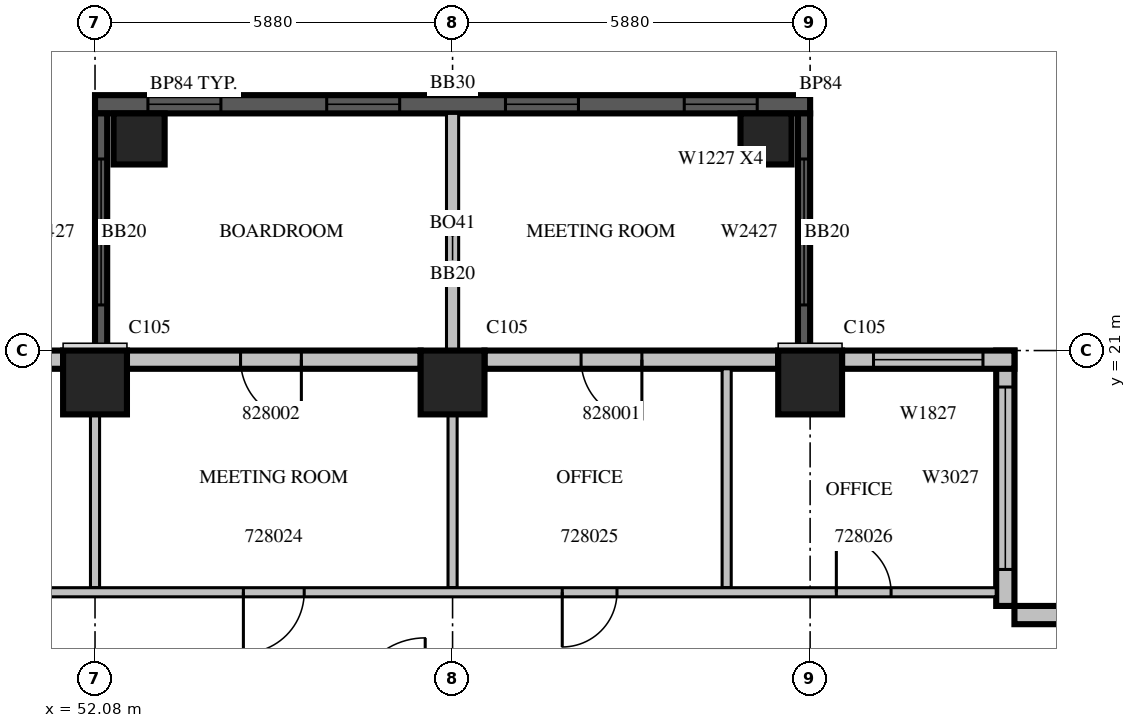
"""IFC4 building model, lengths in metres.
Left out: names, types, materials, properties, quantities, classifications, styles, units other than length and angle.
Written with IfcOpenShell. Run it as: python <this file> out.ifc"""

import sys

from ifc_helpers import new_model, si_unit, direction, frame, frame_2d, origin, origin_2d, place, context, subcontext, project, spatial, rectangle, extrude, source, transform, mapped, element, fill, save


model = new_model("IFC4")
c1 = context("Model", 3, precision=1e-05, world=origin(), true_north=direction((0.0, 1.0)))
c2 = subcontext(c1, "Body", "Model", "MODEL_VIEW")
j1 = project(units=[si_unit("LENGTHUNIT", "METRE"), si_unit("PLANEANGLEUNIT", "RADIAN")], contexts=[c1])
p1 = place(None, origin())
s1 = spatial("IfcSite", under=j1, at=p1, CompositionType="ELEMENT")
p2 = place(p1, origin())
s2 = spatial("IfcBuilding", under=s1, at=p2, CompositionType="ELEMENT")
p3 = place(p2, frame((0.0, 0.0, 128.7)))
s3 = spatial("IfcBuildingStorey", under=s2, at=p3, CompositionType="ELEMENT", Elevation=128.7)
m1 = source(origin(), c2, "Body", "SweptSolid", [
    extrude(rectangle(XDim=1.05, YDim=1.05, at=origin_2d()), origin(), (0.0, 0.0, 1.0), 4.2),
])
for number, where, z_axis, x_axis in (
    (1, (52.08, 20.475, 0.0), (0.0, 0.0, 1.0), (1.0, 0.0, 0.0)),
    (2, (57.96, 20.475, 0.0), (0.0, 0.0, 1.0), (1.0, 0.0, 0.0)),
    (3, (63.84, 20.475, 0.0), (0.0, 0.0, 1.0), (1.0, 0.0, 0.0)),
):
    element("IfcColumn", number, at=place(p3, frame(where, z_axis=z_axis, x_axis=x_axis)), inside=s3, PredefinedType="COLUMN", context=c2, shape_type="MappedRepresentation", body=[
        mapped(m1, transform((0.0, 0.0, 0.0), scale=1.0)),
    ])
m2 = source(origin(), c2, "Body", "SweptSolid", [
    extrude(rectangle(XDim=0.84, YDim=0.84, at=origin_2d()), origin(), (0.0, 0.0, 1.0), 4.2),
])
for number, where, z_axis, x_axis in (
    (4, (52.805, 24.48, 0.0), (0.0, 0.0, 1.0), (1.0, 0.0, 0.0)),
    (5, (63.115, 24.48, 0.0), (0.0, 0.0, 1.0), (1.0, 0.0, 0.0)),
):
    element("IfcColumn", number, at=place(p3, frame(where, z_axis=z_axis, x_axis=x_axis)), inside=s3, PredefinedType="COLUMN", context=c2, shape_type="MappedRepresentation", body=[
        mapped(m2, transform((0.0, 0.0, 0.0), scale=1.0)),
    ])
m3 = source(origin(), c2, "Body", "SweptSolid", [
    extrude(rectangle(XDim=11.76, YDim=0.3, at=frame_2d((5.88, 0.0))), origin(), (0.0, 0.0, 1.0), 3.79),
])
p4 = place(p3, frame((63.84, 25.05, 0.0), z_axis=(0.0, 0.0, 1.0), x_axis=(-1.0, 0.0, 0.0)))
e6 = element("IfcWall", 6, at=p4, inside=s3, PredefinedType="SOLIDWALL", context=c2, shape_type="MappedRepresentation", body=[
    mapped(m3, transform((0.0, 0.0, 0.0), scale=1.0)),
])
m4 = source(origin(), c2, "Body", "SweptSolid", [
    extrude(rectangle(XDim=1.2, YDim=2.7, at=frame_2d((0.6, 1.35))), frame((0.0, 0.16, 0.0), z_axis=(0.0, -1.0, 0.0), x_axis=(1.0, 0.0, 0.0)), (0.0, 0.0, 1.0), 0.32),
])
p5 = place(p4, frame((0.87, 0.0, 0.6)))
e7 = element("IfcOpeningElement", 7, at=p5, cuts=e6, PredefinedType="OPENING", context=c2, shape_type="MappedRepresentation", body=[
    mapped(m4, transform((0.0, 0.0, 0.0), scale=1.0)),
])
p6 = place(p4, frame((3.81, 0.0, 0.6)))
e8 = element("IfcOpeningElement", 8, at=p6, cuts=e6, PredefinedType="OPENING", context=c2, shape_type="MappedRepresentation", body=[
    mapped(m4, transform((0.0, 0.0, 0.0), scale=1.0)),
])
p7 = place(p4, frame((6.75, 0.0, 0.6)))
e9 = element("IfcOpeningElement", 9, at=p7, cuts=e6, PredefinedType="OPENING", context=c2, shape_type="MappedRepresentation", body=[
    mapped(m4, transform((0.0, 0.0, 0.0), scale=1.0)),
])
p8 = place(p4, frame((9.69, 0.0, 0.6)))
e10 = element("IfcOpeningElement", 10, at=p8, cuts=e6, PredefinedType="OPENING", context=c2, shape_type="MappedRepresentation", body=[
    mapped(m4, transform((0.0, 0.0, 0.0), scale=1.0)),
])
m5 = source(origin(), c2, "Body", "SweptSolid", [
    extrude(rectangle(XDim=3.9, YDim=0.2, at=frame_2d((1.95, 0.0))), origin(), (0.0, 0.0, 1.0), 3.79),
])
p9 = place(p3, frame((57.96, 21.0, 0.0), z_axis=(0.0, 0.0, 1.0), x_axis=(0.0, 1.0, 0.0)))
e11 = element("IfcWall", 11, at=p9, inside=s3, PredefinedType="SOLIDWALL", context=c2, shape_type="MappedRepresentation", body=[
    mapped(m5, transform((0.0, 0.0, 0.0), scale=1.0)),
])
m6 = source(origin(), c2, "Body", "SweptSolid", [
    extrude(rectangle(XDim=3.9, YDim=0.2, at=frame_2d((1.95, 0.0))), origin(), (0.0, 0.0, 1.0), 3.79),
])
p10 = place(p3, frame((63.74, 21.0, 0.0), z_axis=(0.0, 0.0, 1.0), x_axis=(0.0, 1.0, 0.0)))
e12 = element("IfcWall", 12, at=p10, inside=s3, PredefinedType="SOLIDWALL", context=c2, shape_type="MappedRepresentation", body=[
    mapped(m6, transform((0.0, 0.0, 0.0), scale=1.0)),
])
m7 = source(origin(), c2, "Body", "SweptSolid", [
    extrude(rectangle(XDim=2.4, YDim=2.7, at=frame_2d((1.2, 1.35))), frame((0.0, 0.11, 0.0), z_axis=(0.0, -1.0, 0.0), x_axis=(1.0, 0.0, 0.0)), (0.0, 0.0, 1.0), 0.22),
])
p11 = place(p10, frame((0.75, 0.0, 0.6)))
e13 = element("IfcOpeningElement", 13, at=p11, cuts=e12, PredefinedType="OPENING", context=c2, shape_type="MappedRepresentation", body=[
    mapped(m7, transform((0.0, 0.0, 0.0), scale=1.0)),
])
p12 = place(p3, frame((52.18, 21.0, 0.0), z_axis=(0.0, 0.0, 1.0), x_axis=(0.0, 1.0, 0.0)))
e14 = element("IfcWall", 14, at=p12, inside=s3, PredefinedType="SOLIDWALL", context=c2, shape_type="MappedRepresentation", body=[
    mapped(m6, transform((0.0, 0.0, 0.0), scale=1.0)),
])
p13 = place(p12, frame((0.75, 0.0, 0.6)))
e15 = element("IfcOpeningElement", 15, at=p13, cuts=e14, PredefinedType="OPENING", context=c2, shape_type="MappedRepresentation", body=[
    mapped(m7, transform((0.0, 0.0, 0.0), scale=1.0)),
])
m8 = source(origin(), c2, "Body", "SweptSolid", [
    extrude(rectangle(XDim=4.2, YDim=0.3, at=frame_2d((2.1, 0.0))), origin(), (0.0, 0.0, 1.0), 3.8),
])
p14 = place(p3, frame((71.4, 16.65, 0.0), z_axis=(0.0, 0.0, 1.0), x_axis=(-1.0, 0.0, 0.0)))
e16 = element("IfcWall", 16, at=p14, inside=s3, PredefinedType="STANDARD", context=c2, shape_type="MappedRepresentation", body=[
    mapped(m8, transform((0.0, 0.0, 0.0), scale=1.0)),
])
p15 = place(p14, frame((0.66, 0.0, 0.6)))
e17 = element("IfcOpeningElement", 17, at=p15, cuts=e16, PredefinedType="OPENING", context=c2, shape_type="MappedRepresentation", body=[
    mapped(m4, transform((0.0, 0.0, 0.0), scale=1.0)),
])
p16 = place(p3, frame((67.05, 16.8, 0.0), z_axis=(0.0, 0.0, 1.0), x_axis=(0.0, 1.0, 0.0)))
e18 = element("IfcWall", 18, at=p16, inside=s3, PredefinedType="STANDARD", context=c2, shape_type="MappedRepresentation", body=[
    mapped(m8, transform((0.0, 0.0, 0.0), scale=1.0)),
])
m9 = source(origin(), c2, "Body", "SweptSolid", [
    extrude(rectangle(XDim=3.0, YDim=2.7, at=frame_2d((1.5, 1.35))), frame((0.0, 0.16, 0.0), z_axis=(0.0, -1.0, 0.0), x_axis=(1.0, 0.0, 0.0)), (0.0, 0.0, 1.0), 0.32),
])
p17 = place(p16, frame((0.6, 0.0, 0.6)))
e19 = element("IfcOpeningElement", 19, at=p17, cuts=e18, PredefinedType="OPENING", context=c2, shape_type="MappedRepresentation", body=[
    mapped(m9, transform((0.0, 0.0, 0.0), scale=1.0)),
])
m10 = source(origin(), c2, "Body", "SweptSolid", [
    extrude(rectangle(XDim=2.835, YDim=0.3, at=frame_2d((1.417, 0.0))), origin(), (0.0, 0.0, 1.0), 3.8),
])
p18 = place(p3, frame((67.2, 20.85, 0.0), z_axis=(0.0, 0.0, 1.0), x_axis=(-1.0, 0.0, 0.0)))
e20 = element("IfcWall", 20, at=p18, inside=s3, PredefinedType="STANDARD", context=c2, shape_type="MappedRepresentation", body=[
    mapped(m10, transform((0.0, 0.0, 0.0), scale=1.0)),
])
m11 = source(origin(), c2, "Body", "SweptSolid", [
    extrude(rectangle(XDim=1.8, YDim=2.7, at=frame_2d((0.9, 1.35))), frame((0.0, 0.16, 0.0), z_axis=(0.0, -1.0, 0.0), x_axis=(1.0, 0.0, 0.0)), (0.0, 0.0, 1.0), 0.32),
])
p19 = place(p18, frame((0.517, 0.0, 0.6)))
e21 = element("IfcOpeningElement", 21, at=p19, cuts=e20, PredefinedType="OPENING", context=c2, shape_type="MappedRepresentation", body=[
    mapped(m11, transform((0.0, 0.0, 0.0), scale=1.0)),
])
m12 = source(origin(), c2, "Body", "SweptSolid", [
    extrude(rectangle(XDim=4.83, YDim=0.3, at=frame_2d((2.415, 0.0))), origin(), (0.0, 0.0, 1.0), 3.8),
])
p20 = place(p3, frame((63.315, 20.85, 0.0), z_axis=(0.0, 0.0, 1.0), x_axis=(-1.0, 0.0, 0.0)))
e22 = element("IfcWall", 22, at=p20, inside=s3, PredefinedType="STANDARD", context=c2, shape_type="MappedRepresentation", body=[
    mapped(m12, transform((0.0, 0.0, 0.0), scale=1.0)),
])
m13 = source(origin(), c2, "Body", "SweptSolid", [
    extrude(rectangle(XDim=1.0, YDim=2.1, at=frame_2d((0.5, 1.05))), frame((0.0, 0.16, 0.0), z_axis=(0.0, -1.0, 0.0), x_axis=(1.0, 0.0, 0.0)), (0.0, 0.0, 1.0), 0.32),
])
p21 = place(p20, frame((2.242, 0.0, 0.0)))
e23 = element("IfcOpeningElement", 23, at=p21, cuts=e22, PredefinedType="OPENING", context=c2, shape_type="MappedRepresentation", body=[
    mapped(m13, transform((0.0, 0.0, 0.0), scale=1.0)),
])
p22 = place(p3, frame((57.435, 20.85, 0.0), z_axis=(0.0, 0.0, 1.0), x_axis=(-1.0, 0.0, 0.0)))
e24 = element("IfcWall", 24, at=p22, inside=s3, PredefinedType="STANDARD", context=c2, shape_type="MappedRepresentation", body=[
    mapped(m12, transform((0.0, 0.0, 0.0), scale=1.0)),
])
p23 = place(p22, frame((1.962, 0.0, 0.0)))
e25 = element("IfcOpeningElement", 25, at=p23, cuts=e24, PredefinedType="OPENING", context=c2, shape_type="MappedRepresentation", body=[
    mapped(m13, transform((0.0, 0.0, 0.0), scale=1.0)),
])
m14 = source(origin(), c2, "Body", "SweptSolid", [
    extrude(rectangle(XDim=1.155, YDim=0.3, at=frame_2d((0.578, 0.0))), origin(), (0.0, 0.0, 1.0), 3.8),
])
p24 = place(p3, frame((51.555, 20.85, 0.0), z_axis=(0.0, 0.0, 1.0), x_axis=(-1.0, 0.0, 0.0)))
e26 = element("IfcWall", 26, at=p24, inside=s3, PredefinedType="STANDARD", context=c2, shape_type="MappedRepresentation", body=[
    mapped(m14, transform((0.0, 0.0, 0.0), scale=1.0)),
])
m15 = source(origin(), c2, "Body", "SweptSolid", [
    extrude(rectangle(XDim=3.6, YDim=0.15, at=frame_2d((1.8, 0.0))), origin(), (0.0, 0.0, 1.0), 3.8),
])
p25 = place(p3, frame((62.468, 20.7, 0.0), z_axis=(0.0, 0.0, 1.0), x_axis=(0.0, -1.0, 0.0)))
e27 = element("IfcWall", 27, at=p25, inside=s3, PredefinedType="PARTITIONING", context=c2, shape_type="MappedRepresentation", body=[
    mapped(m15, transform((0.0, 0.0, 0.0), scale=1.0)),
])
m16 = source(origin(), c2, "Body", "SweptSolid", [
    extrude(rectangle(XDim=2.851, YDim=0.15, at=frame_2d((1.425, 0.0))), origin(), (0.0, 0.0, 1.0), 3.8),
])
for number, where, z_axis, x_axis in (
    (28, (52.08, 17.1, 0.0), (0.0, 0.0, 1.0), (0.0, 1.0, 0.0)),
    (29, (57.96, 17.1, 0.0), (0.0, 0.0, 1.0), (0.0, 1.0, 0.0)),
):
    element("IfcWall", number, at=place(p3, frame(where, z_axis=z_axis, x_axis=x_axis)), inside=s3, PredefinedType="PARTITIONING", context=c2, shape_type="MappedRepresentation", body=[
        mapped(m16, transform((0.0, 0.0, 0.0), scale=1.0)),
    ])
m17 = source(origin(), c2, "Body", "SweptSolid", [
    extrude(rectangle(XDim=37.5, YDim=0.15, at=frame_2d((18.75, 0.0))), origin(), (0.0, 0.0, 1.0), 3.8),
])
p26 = place(p3, frame((29.4, 17.025, 0.0), z_axis=(0.0, 0.0, 1.0), x_axis=(1.0, 0.0, 0.0)))
e30 = element("IfcWall", 30, at=p26, inside=s3, PredefinedType="PARTITIONING", context=c2, shape_type="MappedRepresentation", body=[
    mapped(m17, transform((0.0, 0.0, 0.0), scale=1.0)),
])
m18 = source(origin(), c2, "Body", "SweptSolid", [
    extrude(rectangle(XDim=1.0, YDim=2.1, at=frame_2d((0.5, 1.05))), frame((0.0, 0.085, 0.0), z_axis=(0.0, -1.0, 0.0), x_axis=(1.0, 0.0, 0.0)), (0.0, 0.0, 1.0), 0.17),
])
p27 = place(p26, frame((1.357, 0.0, 0.0)))
e31 = element("IfcOpeningElement", 31, at=p27, cuts=e30, PredefinedType="OPENING", context=c2, shape_type="MappedRepresentation", body=[
    mapped(m18, transform((0.0, 0.0, 0.0), scale=1.0)),
])
p28 = place(p26, frame((4.669, 0.0, 0.0)))
e32 = element("IfcOpeningElement", 32, at=p28, cuts=e30, PredefinedType="OPENING", context=c2, shape_type="MappedRepresentation", body=[
    mapped(m18, transform((0.0, 0.0, 0.0), scale=1.0)),
])
p29 = place(p26, frame((7.012, 0.0, 0.0)))
e33 = element("IfcOpeningElement", 33, at=p29, cuts=e30, PredefinedType="OPENING", context=c2, shape_type="MappedRepresentation", body=[
    mapped(m18, transform((0.0, 0.0, 0.0), scale=1.0)),
])
m19 = source(origin(), c2, "Body", "SweptSolid", [
    extrude(rectangle(XDim=0.9, YDim=2.1, at=frame_2d((0.45, 1.05))), frame((0.0, 0.085, 0.0), z_axis=(0.0, -1.0, 0.0), x_axis=(1.0, 0.0, 0.0)), (0.0, 0.0, 1.0), 0.17),
])
p30 = place(p26, frame((10.342, 0.0, 0.0)))
e34 = element("IfcOpeningElement", 34, at=p30, cuts=e30, PredefinedType="OPENING", context=c2, shape_type="MappedRepresentation", body=[
    mapped(m19, transform((0.0, 0.0, 0.0), scale=1.0)),
])
p31 = place(p26, frame((15.09, 0.0, 0.0)))
e35 = element("IfcOpeningElement", 35, at=p31, cuts=e30, PredefinedType="OPENING", context=c2, shape_type="MappedRepresentation", body=[
    mapped(m19, transform((0.0, 0.0, 0.0), scale=1.0)),
])
p32 = place(p26, frame((19.837, 0.0, 0.0)))
e36 = element("IfcOpeningElement", 36, at=p32, cuts=e30, PredefinedType="OPENING", context=c2, shape_type="MappedRepresentation", body=[
    mapped(m19, transform((0.0, 0.0, 0.0), scale=1.0)),
])
p33 = place(p26, frame((25.12, 0.0, 0.0)))
e37 = element("IfcOpeningElement", 37, at=p33, cuts=e30, PredefinedType="OPENING", context=c2, shape_type="MappedRepresentation", body=[
    mapped(m18, transform((0.0, 0.0, 0.0), scale=1.0)),
])
p34 = place(p26, frame((30.364, 0.0, 0.0)))
e38 = element("IfcOpeningElement", 38, at=p34, cuts=e30, PredefinedType="OPENING", context=c2, shape_type="MappedRepresentation", body=[
    mapped(m19, transform((0.0, 0.0, 0.0), scale=1.0)),
])
p35 = place(p26, frame((34.871, 0.0, 0.0)))
e39 = element("IfcOpeningElement", 39, at=p35, cuts=e30, PredefinedType="OPENING", context=c2, shape_type="MappedRepresentation", body=[
    mapped(m19, transform((0.0, 0.0, 0.0), scale=1.0)),
])
m20 = source(origin(), c2, "Body", "SweptSolid", [
    extrude(rectangle(XDim=1.2, YDim=2.7, at=frame_2d((0.6, 1.35))), frame((0.0, 0.03, 0.0), z_axis=(0.0, -1.0, 0.0), x_axis=(1.0, 0.0, 0.0)), (0.0, 0.0, 1.0), 0.06),
])
p36 = place(p5, origin())
e40 = element("IfcWindow", 40, at=p36, inside=s3, PartitioningType="SINGLE_PANEL", PredefinedType="WINDOW", context=c2, shape_type="MappedRepresentation", body=[
    mapped(m20, transform((0.0, 0.0, 0.0), scale=1.0)),
])
fill(e7, e40)
p37 = place(p6, origin())
e41 = element("IfcWindow", 41, at=p37, inside=s3, PartitioningType="SINGLE_PANEL", PredefinedType="WINDOW", context=c2, shape_type="MappedRepresentation", body=[
    mapped(m20, transform((0.0, 0.0, 0.0), scale=1.0)),
])
fill(e8, e41)
p38 = place(p7, origin())
e42 = element("IfcWindow", 42, at=p38, inside=s3, PartitioningType="SINGLE_PANEL", PredefinedType="WINDOW", context=c2, shape_type="MappedRepresentation", body=[
    mapped(m20, transform((0.0, 0.0, 0.0), scale=1.0)),
])
fill(e9, e42)
p39 = place(p8, origin())
e43 = element("IfcWindow", 43, at=p39, inside=s3, PartitioningType="SINGLE_PANEL", PredefinedType="WINDOW", context=c2, shape_type="MappedRepresentation", body=[
    mapped(m20, transform((0.0, 0.0, 0.0), scale=1.0)),
])
fill(e10, e43)
m21 = source(origin(), c2, "Body", "SweptSolid", [
    extrude(rectangle(XDim=2.4, YDim=2.7, at=frame_2d((1.2, 1.35))), frame((0.0, 0.03, 0.0), z_axis=(0.0, -1.0, 0.0), x_axis=(1.0, 0.0, 0.0)), (0.0, 0.0, 1.0), 0.06),
])
p40 = place(p11, origin())
e44 = element("IfcWindow", 44, at=p40, inside=s3, PartitioningType="SINGLE_PANEL", PredefinedType="WINDOW", context=c2, shape_type="MappedRepresentation", body=[
    mapped(m21, transform((0.0, 0.0, 0.0), scale=1.0)),
])
fill(e13, e44)
p41 = place(p13, origin())
e45 = element("IfcWindow", 45, at=p41, inside=s3, PartitioningType="SINGLE_PANEL", PredefinedType="WINDOW", context=c2, shape_type="MappedRepresentation", body=[
    mapped(m21, transform((0.0, 0.0, 0.0), scale=1.0)),
])
fill(e15, e45)
m22 = source(origin(), c2, "Body", "SweptSolid", [
    extrude(rectangle(XDim=3.0, YDim=2.7, at=frame_2d((1.5, 1.35))), frame((0.0, 0.03, 0.0), z_axis=(0.0, -1.0, 0.0), x_axis=(1.0, 0.0, 0.0)), (0.0, 0.0, 1.0), 0.06),
])
p42 = place(p17, origin())
e46 = element("IfcWindow", 46, at=p42, inside=s3, PartitioningType="SINGLE_PANEL", PredefinedType="WINDOW", context=c2, shape_type="MappedRepresentation", body=[
    mapped(m22, transform((0.0, 0.0, 0.0), scale=1.0)),
])
fill(e19, e46)
m23 = source(origin(), c2, "Body", "SweptSolid", [
    extrude(rectangle(XDim=1.8, YDim=2.7, at=frame_2d((0.9, 1.35))), frame((0.0, 0.03, 0.0), z_axis=(0.0, -1.0, 0.0), x_axis=(1.0, 0.0, 0.0)), (0.0, 0.0, 1.0), 0.06),
])
p43 = place(p19, origin())
e47 = element("IfcWindow", 47, at=p43, inside=s3, PartitioningType="SINGLE_PANEL", PredefinedType="WINDOW", context=c2, shape_type="MappedRepresentation", body=[
    mapped(m23, transform((0.0, 0.0, 0.0), scale=1.0)),
])
fill(e21, e47)
m24 = source(origin(), c2, "Body", "SweptSolid", [
    extrude(rectangle(XDim=1.0, YDim=2.1, at=frame_2d((0.5, 1.05))), frame((0.0, 0.025, 0.0), z_axis=(0.0, -1.0, 0.0), x_axis=(1.0, 0.0, 0.0)), (0.0, 0.0, 1.0), 0.05),
])
p44 = place(p33, origin())
e48 = element("IfcDoor", 48, at=p44, inside=s3, OperationType="SINGLE_SWING_RIGHT", PredefinedType="DOOR", context=c2, shape_type="MappedRepresentation", body=[
    mapped(m24, transform((0.0, 0.0, 0.0), scale=1.0)),
])
fill(e37, e48)
m25 = source(origin(), c2, "Body", "SweptSolid", [
    extrude(rectangle(XDim=0.9, YDim=2.1, at=frame_2d((0.45, 1.05))), frame((0.0, 0.025, 0.0), z_axis=(0.0, -1.0, 0.0), x_axis=(1.0, 0.0, 0.0)), (0.0, 0.0, 1.0), 0.05),
])
p45 = place(p34, origin())
e49 = element("IfcDoor", 49, at=p45, inside=s3, OperationType="SINGLE_SWING_RIGHT", PredefinedType="DOOR", context=c2, shape_type="MappedRepresentation", body=[
    mapped(m25, transform((0.0, 0.0, 0.0), scale=1.0)),
])
fill(e38, e49)
p46 = place(p35, origin())
e50 = element("IfcDoor", 50, at=p46, inside=s3, OperationType="SINGLE_SWING_LEFT", PredefinedType="DOOR", context=c2, shape_type="MappedRepresentation", body=[
    mapped(m25, transform((0.0, 0.0, 0.0), scale=1.0)),
])
fill(e39, e50)
p47 = place(p21, origin())
e51 = element("IfcDoor", 51, at=p47, inside=s3, OperationType="SINGLE_SWING_LEFT", PredefinedType="DOOR", context=c2, shape_type="MappedRepresentation", body=[
    mapped(m24, transform((0.0, 0.0, 0.0), scale=1.0)),
])
fill(e23, e51)
p48 = place(p23, origin())
e52 = element("IfcDoor", 52, at=p48, inside=s3, OperationType="SINGLE_SWING_LEFT", PredefinedType="DOOR", context=c2, shape_type="MappedRepresentation", body=[
    mapped(m24, transform((0.0, 0.0, 0.0), scale=1.0)),
])
fill(e25, e52)
save(model, sys.argv[1])
